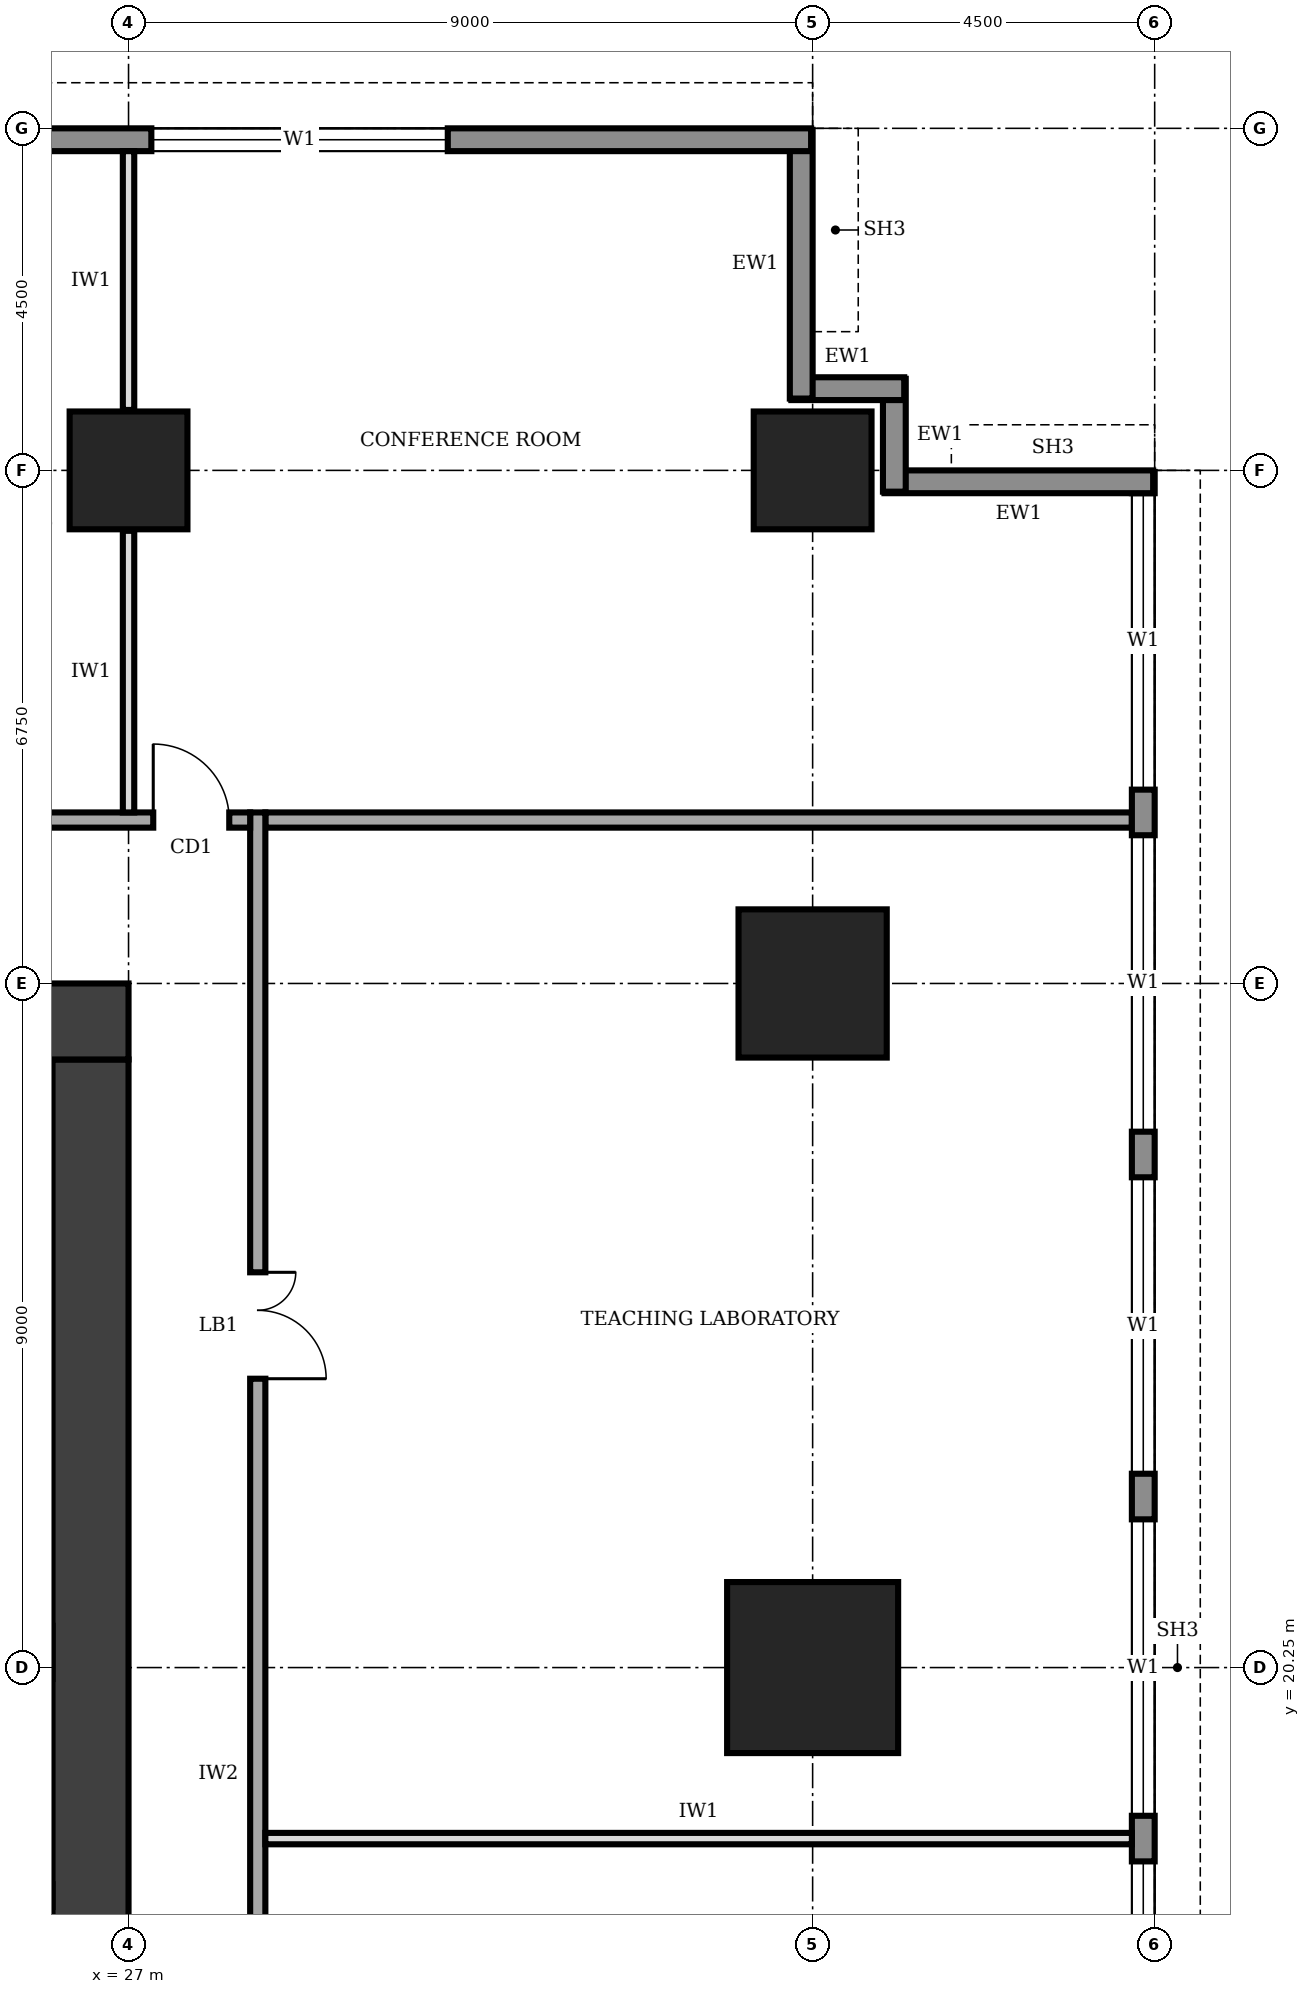
"""IFC4 building model, lengths in metres.
Left out: names, types, materials, properties, quantities, classifications, styles, units other than length and angle.
Written with IfcOpenShell. Run it as: python <this file> out.ifc"""

import sys

from ifc_helpers import new_model, si_unit, direction, frame, frame_2d, origin, origin_2d, place, context, subcontext, project, spatial, rectangle, extrude, element, fill, save


model = new_model("IFC4")
c1 = context("Model", 3, precision=1e-05, world=origin(), true_north=direction((0.0, 1.0)))
c2 = subcontext(c1, "Body", "Model", "MODEL_VIEW")
j1 = project(units=[si_unit("LENGTHUNIT", "METRE"), si_unit("PLANEANGLEUNIT", "RADIAN")], contexts=[c1])
p1 = place(None, origin())
s1 = spatial("IfcSite", under=j1, at=p1, CompositionType="ELEMENT")
p2 = place(p1, origin())
s2 = spatial("IfcBuilding", under=s1, at=p2, CompositionType="ELEMENT")
p3 = place(p2, frame((0.0, 0.0, 213.0)))
s3 = spatial("IfcBuildingStorey", under=s2, at=p3, CompositionType="ELEMENT", Elevation=213.0)
p4 = place(p3, frame((26.5, 12.25, 0.0), z_axis=(0.0, 0.0, 1.0), x_axis=(0.0, 1.0, 0.0)))
e1 = element("IfcWall", 1, at=p4, inside=s3, PredefinedType="SHEAR", context=c2, shape_type="SweptSolid", body=[
    extrude(rectangle(XDim=16.0, YDim=1.0, at=frame_2d((8.0, 0.0))), origin(), (0.0, 0.0, 1.0), 4.0),
])
p5 = place(p3, frame((27.0, 28.75, 0.0), z_axis=(0.0, 0.0, 1.0), x_axis=(-1.0, 0.0, 0.0)))
e2 = element("IfcWall", 2, at=p5, inside=s3, PredefinedType="SHEAR", context=c2, shape_type="SweptSolid", body=[
    extrude(rectangle(XDim=13.5, YDim=1.0, at=frame_2d((6.75, 0.0))), origin(), (0.0, 0.0, 1.0), 4.0),
])
p6 = place(p5, frame((4.75, 0.0, 0.0)))
e3 = element("IfcOpeningElement", 3, at=p6, cuts=e2, PredefinedType="OPENING", context=c2, shape_type="SweptSolid", body=[
    extrude(rectangle(XDim=1.8, YDim=2.1, at=frame_2d((0.9, 1.05))), frame((0.0, 0.51, 0.0), z_axis=(0.0, -1.0, 0.0), x_axis=(1.0, 0.0, 0.0)), (0.0, 0.0, 1.0), 1.02),
])
p7 = place(p3, frame((36.0, 20.25, 0.0), z_axis=(0.0, 0.0, 1.0), x_axis=(1.0, 0.0, 0.0)))
e4 = element("IfcColumn", 4, at=p7, inside=s3, PredefinedType="COLUMN", context=c2, shape_type="SweptSolid", body=[
    extrude(rectangle(XDim=2.25, YDim=2.25, at=origin_2d()), origin(), (0.0, 0.0, 1.0), 4.0),
])
p8 = place(p3, frame((36.0, 29.25, 0.0), z_axis=(0.0, 0.0, 1.0), x_axis=(1.0, 0.0, 0.0)))
e5 = element("IfcColumn", 5, at=p8, inside=s3, PredefinedType="COLUMN", context=c2, shape_type="SweptSolid", body=[
    extrude(rectangle(XDim=1.95, YDim=1.95, at=origin_2d()), origin(), (0.0, 0.0, 1.0), 4.0),
])
for number, where, z_axis, x_axis in (
    (6, (27.0, 36.0, 0.0), (0.0, 0.0, 1.0), (1.0, 0.0, 0.0)),
    (7, (36.0, 36.0, 0.0), (0.0, 0.0, 1.0), (1.0, 0.0, 0.0)),
):
    element("IfcColumn", number, at=place(p3, frame(where, z_axis=z_axis, x_axis=x_axis)), inside=s3, PredefinedType="COLUMN", context=c2, shape_type="SweptSolid", body=[
        extrude(rectangle(XDim=1.55, YDim=1.55, at=origin_2d()), origin(), (0.0, 0.0, 1.0), 4.0),
    ])
p9 = place(p3, frame((40.35, 4.52, 0.0), z_axis=(0.0, 0.0, 1.0), x_axis=(0.0, 1.0, 0.0)))
e8 = element("IfcWall", 8, at=p9, inside=s3, PredefinedType="STANDARD", context=c2, shape_type="SweptSolid", body=[
    extrude(rectangle(XDim=31.46, YDim=0.3, at=frame_2d((15.73, 0.0))), origin(), (0.0, 0.0, 1.0), 3.75),
])
p10 = place(p9, frame((4.78, 0.0, 0.9)))
e9 = element("IfcOpeningElement", 9, at=p10, cuts=e8, PredefinedType="OPENING", context=c2, shape_type="SweptSolid", body=[
    extrude(rectangle(XDim=3.9, YDim=2.2, at=frame_2d((1.95, 1.1))), frame((0.0, 0.16, 0.0), z_axis=(0.0, -1.0, 0.0), x_axis=(1.0, 0.0, 0.0)), (0.0, 0.0, 1.0), 0.32),
])
p11 = place(p9, frame((9.28, 0.0, 0.9)))
e10 = element("IfcOpeningElement", 10, at=p11, cuts=e8, PredefinedType="OPENING", context=c2, shape_type="SweptSolid", body=[
    extrude(rectangle(XDim=3.9, YDim=2.2, at=frame_2d((1.95, 1.1))), frame((0.0, 0.16, 0.0), z_axis=(0.0, -1.0, 0.0), x_axis=(1.0, 0.0, 0.0)), (0.0, 0.0, 1.0), 0.32),
])
p12 = place(p9, frame((13.78, 0.0, 0.9)))
e11 = element("IfcOpeningElement", 11, at=p12, cuts=e8, PredefinedType="OPENING", context=c2, shape_type="SweptSolid", body=[
    extrude(rectangle(XDim=3.9, YDim=2.2, at=frame_2d((1.95, 1.1))), frame((0.0, 0.16, 0.0), z_axis=(0.0, -1.0, 0.0), x_axis=(1.0, 0.0, 0.0)), (0.0, 0.0, 1.0), 0.32),
])
p13 = place(p9, frame((18.28, 0.0, 0.9)))
e12 = element("IfcOpeningElement", 12, at=p13, cuts=e8, PredefinedType="OPENING", context=c2, shape_type="SweptSolid", body=[
    extrude(rectangle(XDim=3.9, YDim=2.2, at=frame_2d((1.95, 1.1))), frame((0.0, 0.16, 0.0), z_axis=(0.0, -1.0, 0.0), x_axis=(1.0, 0.0, 0.0)), (0.0, 0.0, 1.0), 0.32),
])
p14 = place(p9, frame((22.78, 0.0, 0.9)))
e13 = element("IfcOpeningElement", 13, at=p14, cuts=e8, PredefinedType="OPENING", context=c2, shape_type="SweptSolid", body=[
    extrude(rectangle(XDim=3.9, YDim=2.2, at=frame_2d((1.95, 1.1))), frame((0.0, 0.16, 0.0), z_axis=(0.0, -1.0, 0.0), x_axis=(1.0, 0.0, 0.0)), (0.0, 0.0, 1.0), 0.32),
])
p15 = place(p9, frame((27.28, 0.0, 0.9)))
e14 = element("IfcOpeningElement", 14, at=p15, cuts=e8, PredefinedType="OPENING", context=c2, shape_type="SweptSolid", body=[
    extrude(rectangle(XDim=3.9, YDim=2.2, at=frame_2d((1.95, 1.1))), frame((0.0, 0.16, 0.0), z_axis=(0.0, -1.0, 0.0), x_axis=(1.0, 0.0, 0.0)), (0.0, 0.0, 1.0), 0.32),
])
p16 = place(p3, frame((40.48, 35.85, 0.0), z_axis=(0.0, 0.0, 1.0), x_axis=(-1.0, 0.0, 0.0)))
e15 = element("IfcWall", 15, at=p16, inside=s3, PredefinedType="STANDARD", context=c2, shape_type="SweptSolid", body=[
    extrude(rectangle(XDim=3.535, YDim=0.3, at=frame_2d((1.768, 0.0))), origin(), (0.0, 0.0, 1.0), 2.85),
])
for number, where, z_axis, x_axis in (
    (16, (37.075, 35.72, 0.0), (0.0, 0.0, 1.0), (0.0, 1.0, 0.0)),
    (17, (37.205, 37.075, 0.0), (0.0, 0.0, 1.0), (-1.0, 0.0, 0.0)),
):
    element("IfcWall", number, at=place(p3, frame(where, z_axis=z_axis, x_axis=x_axis)), inside=s3, PredefinedType="STANDARD", context=c2, shape_type="SweptSolid", body=[
        extrude(rectangle(XDim=1.485, YDim=0.3, at=frame_2d((0.743, 0.0))), origin(), (0.0, 0.0, 1.0), 3.75),
    ])
p17 = place(p3, frame((35.85, 36.945, 0.0), z_axis=(0.0, 0.0, 1.0), x_axis=(0.0, 1.0, 0.0)))
e18 = element("IfcWall", 18, at=p17, inside=s3, PredefinedType="STANDARD", context=c2, shape_type="SweptSolid", body=[
    extrude(rectangle(XDim=3.535, YDim=0.3, at=frame_2d((1.768, 0.0))), origin(), (0.0, 0.0, 1.0), 2.85),
])
p18 = place(p3, frame((35.98, 40.35, 0.0), z_axis=(0.0, 0.0, 1.0), x_axis=(-1.0, 0.0, 0.0)))
e19 = element("IfcWall", 19, at=p18, inside=s3, PredefinedType="STANDARD", context=c2, shape_type="SweptSolid", body=[
    extrude(rectangle(XDim=31.46, YDim=0.3, at=frame_2d((15.73, 0.0))), origin(), (0.0, 0.0, 1.0), 3.75),
])
p19 = place(p18, frame((27.28, 0.0, 0.9)))
e20 = element("IfcOpeningElement", 20, at=p19, cuts=e19, PredefinedType="OPENING", context=c2, shape_type="SweptSolid", body=[
    extrude(rectangle(XDim=3.9, YDim=2.2, at=frame_2d((1.95, 1.1))), frame((0.0, 0.16, 0.0), z_axis=(0.0, -1.0, 0.0), x_axis=(1.0, 0.0, 0.0)), (0.0, 0.0, 1.0), 0.32),
])
p20 = place(p18, frame((22.78, 0.0, 0.9)))
e21 = element("IfcOpeningElement", 21, at=p20, cuts=e19, PredefinedType="OPENING", context=c2, shape_type="SweptSolid", body=[
    extrude(rectangle(XDim=3.9, YDim=2.2, at=frame_2d((1.95, 1.1))), frame((0.0, 0.16, 0.0), z_axis=(0.0, -1.0, 0.0), x_axis=(1.0, 0.0, 0.0)), (0.0, 0.0, 1.0), 0.32),
])
p21 = place(p18, frame((4.78, 0.0, 0.9)))
e22 = element("IfcOpeningElement", 22, at=p21, cuts=e19, PredefinedType="OPENING", context=c2, shape_type="SweptSolid", body=[
    extrude(rectangle(XDim=3.9, YDim=2.2, at=frame_2d((1.95, 1.1))), frame((0.0, 0.16, 0.0), z_axis=(0.0, -1.0, 0.0), x_axis=(1.0, 0.0, 0.0)), (0.0, 0.0, 1.0), 0.32),
])
p22 = place(p3, frame((28.7, 7.7, 0.0), z_axis=(0.0, 0.0, 1.0), x_axis=(0.0, 1.0, 0.0)))
e23 = element("IfcWall", 23, at=p22, inside=s3, PredefinedType="SOLIDWALL", context=c2, shape_type="SweptSolid", body=[
    extrude(rectangle(XDim=23.8, YDim=0.2, at=frame_2d((11.9, 0.0))), origin(), (0.0, 0.0, 1.0), 3.75),
])
p23 = place(p22, frame((4.15, 0.0, 0.0)))
e24 = element("IfcOpeningElement", 24, at=p23, cuts=e23, PredefinedType="OPENING", context=c2, shape_type="SweptSolid", body=[
    extrude(rectangle(XDim=1.8, YDim=2.1, at=frame_2d((0.9, 1.05))), frame((0.0, 0.11, 0.0), z_axis=(0.0, -1.0, 0.0), x_axis=(1.0, 0.0, 0.0)), (0.0, 0.0, 1.0), 0.22),
])
p24 = place(p22, frame((16.35, 0.0, 0.0)))
e25 = element("IfcOpeningElement", 25, at=p24, cuts=e23, PredefinedType="OPENING", context=c2, shape_type="SweptSolid", body=[
    extrude(rectangle(XDim=1.4, YDim=2.1, at=frame_2d((0.7, 1.05))), frame((0.0, 0.11, 0.0), z_axis=(0.0, -1.0, 0.0), x_axis=(1.0, 0.0, 0.0)), (0.0, 0.0, 1.0), 0.22),
])
p25 = place(p3, frame((28.6, 31.4, 0.0), z_axis=(0.0, 0.0, 1.0), x_axis=(-1.0, 0.0, 0.0)))
e26 = element("IfcWall", 26, at=p25, inside=s3, PredefinedType="SOLIDWALL", context=c2, shape_type="SweptSolid", body=[
    extrude(rectangle(XDim=16.9, YDim=0.2, at=frame_2d((8.45, 0.0))), origin(), (0.0, 0.0, 1.0), 3.75),
])
p26 = place(p25, frame((15.425, 0.0, 0.0)))
e27 = element("IfcOpeningElement", 27, at=p26, cuts=e26, PredefinedType="OPENING", context=c2, shape_type="SweptSolid", body=[
    extrude(rectangle(XDim=1.0, YDim=2.1, at=frame_2d((0.5, 1.05))), frame((0.0, 0.11, 0.0), z_axis=(0.0, -1.0, 0.0), x_axis=(1.0, 0.0, 0.0)), (0.0, 0.0, 1.0), 0.22),
])
p27 = place(p25, frame((12.35, 0.0, 0.0)))
e28 = element("IfcOpeningElement", 28, at=p27, cuts=e26, PredefinedType="OPENING", context=c2, shape_type="SweptSolid", body=[
    extrude(rectangle(XDim=1.0, YDim=2.1, at=frame_2d((0.5, 1.05))), frame((0.0, 0.11, 0.0), z_axis=(0.0, -1.0, 0.0), x_axis=(1.0, 0.0, 0.0)), (0.0, 0.0, 1.0), 0.22),
])
p28 = place(p25, frame((5.6, 0.0, 0.0)))
e29 = element("IfcOpeningElement", 29, at=p28, cuts=e26, PredefinedType="OPENING", context=c2, shape_type="SweptSolid", body=[
    extrude(rectangle(XDim=1.0, YDim=2.1, at=frame_2d((0.5, 1.05))), frame((0.0, 0.11, 0.0), z_axis=(0.0, -1.0, 0.0), x_axis=(1.0, 0.0, 0.0)), (0.0, 0.0, 1.0), 0.22),
])
p29 = place(p25, frame((0.275, 0.0, 0.0)))
e30 = element("IfcOpeningElement", 30, at=p29, cuts=e26, PredefinedType="OPENING", context=c2, shape_type="SweptSolid", body=[
    extrude(rectangle(XDim=1.0, YDim=2.1, at=frame_2d((0.5, 1.05))), frame((0.0, 0.11, 0.0), z_axis=(0.0, -1.0, 0.0), x_axis=(1.0, 0.0, 0.0)), (0.0, 0.0, 1.0), 0.22),
])
p30 = place(p3, frame((28.8, 31.4, 0.0), z_axis=(0.0, 0.0, 1.0), x_axis=(1.0, 0.0, 0.0)))
e31 = element("IfcWall", 31, at=p30, inside=s3, PredefinedType="SOLIDWALL", context=c2, shape_type="SweptSolid", body=[
    extrude(rectangle(XDim=11.4, YDim=0.2, at=frame_2d((5.7, 0.0))), origin(), (0.0, 0.0, 1.0), 3.75),
])
p31 = place(p3, frame((27.0, 31.5, 0.0), z_axis=(0.0, 0.0, 1.0), x_axis=(0.0, 1.0, 0.0)))
e32 = element("IfcWall", 32, at=p31, inside=s3, PredefinedType="PARTITIONING", context=c2, shape_type="SweptSolid", body=[
    extrude(rectangle(XDim=3.705, YDim=0.15, at=frame_2d((1.853, 0.0))), origin(), (0.0, 0.0, 1.0), 2.85),
])
p32 = place(p3, frame((27.0, 36.795, 0.0), z_axis=(0.0, 0.0, 1.0), x_axis=(0.0, 1.0, 0.0)))
e33 = element("IfcWall", 33, at=p32, inside=s3, PredefinedType="PARTITIONING", context=c2, shape_type="SweptSolid", body=[
    extrude(rectangle(XDim=3.405, YDim=0.15, at=frame_2d((1.703, 0.0))), origin(), (0.0, 0.0, 1.0), 2.85),
])
p33 = place(p3, frame((28.8, 18.0, 0.0), z_axis=(0.0, 0.0, 1.0), x_axis=(1.0, 0.0, 0.0)))
e34 = element("IfcWall", 34, at=p33, inside=s3, PredefinedType="PARTITIONING", context=c2, shape_type="SweptSolid", body=[
    extrude(rectangle(XDim=11.4, YDim=0.15, at=frame_2d((5.7, 0.0))), origin(), (0.0, 0.0, 1.0), 3.75),
])
p34 = place(p11, origin())
e35 = element("IfcWindow", 35, at=p34, inside=s3, PartitioningType="SINGLE_PANEL", PredefinedType="WINDOW", context=c2, shape_type="SweptSolid", body=[
    extrude(rectangle(XDim=3.9, YDim=2.2, at=frame_2d((1.95, 1.1))), frame((0.0, 0.03, 0.0), z_axis=(0.0, -1.0, 0.0), x_axis=(1.0, 0.0, 0.0)), (0.0, 0.0, 1.0), 0.06),
])
fill(e10, e35)
p35 = place(p12, origin())
e36 = element("IfcWindow", 36, at=p35, inside=s3, PartitioningType="SINGLE_PANEL", PredefinedType="WINDOW", context=c2, shape_type="SweptSolid", body=[
    extrude(rectangle(XDim=3.9, YDim=2.2, at=frame_2d((1.95, 1.1))), frame((0.0, 0.03, 0.0), z_axis=(0.0, -1.0, 0.0), x_axis=(1.0, 0.0, 0.0)), (0.0, 0.0, 1.0), 0.06),
])
fill(e11, e36)
p36 = place(p13, origin())
e37 = element("IfcWindow", 37, at=p36, inside=s3, PartitioningType="SINGLE_PANEL", PredefinedType="WINDOW", context=c2, shape_type="SweptSolid", body=[
    extrude(rectangle(XDim=3.9, YDim=2.2, at=frame_2d((1.95, 1.1))), frame((0.0, 0.03, 0.0), z_axis=(0.0, -1.0, 0.0), x_axis=(1.0, 0.0, 0.0)), (0.0, 0.0, 1.0), 0.06),
])
fill(e12, e37)
p37 = place(p14, origin())
e38 = element("IfcWindow", 38, at=p37, inside=s3, PartitioningType="SINGLE_PANEL", PredefinedType="WINDOW", context=c2, shape_type="SweptSolid", body=[
    extrude(rectangle(XDim=3.9, YDim=2.2, at=frame_2d((1.95, 1.1))), frame((0.0, 0.03, 0.0), z_axis=(0.0, -1.0, 0.0), x_axis=(1.0, 0.0, 0.0)), (0.0, 0.0, 1.0), 0.06),
])
fill(e13, e38)
p38 = place(p15, origin())
e39 = element("IfcWindow", 39, at=p38, inside=s3, PartitioningType="SINGLE_PANEL", PredefinedType="WINDOW", context=c2, shape_type="SweptSolid", body=[
    extrude(rectangle(XDim=3.9, YDim=2.2, at=frame_2d((1.95, 1.1))), frame((0.0, 0.03, 0.0), z_axis=(0.0, -1.0, 0.0), x_axis=(1.0, 0.0, 0.0)), (0.0, 0.0, 1.0), 0.06),
])
fill(e14, e39)
p39 = place(p21, origin())
e40 = element("IfcWindow", 40, at=p39, inside=s3, PartitioningType="SINGLE_PANEL", PredefinedType="WINDOW", context=c2, shape_type="SweptSolid", body=[
    extrude(rectangle(XDim=3.9, YDim=2.2, at=frame_2d((1.95, 1.1))), frame((0.0, 0.03, 0.0), z_axis=(0.0, -1.0, 0.0), x_axis=(1.0, 0.0, 0.0)), (0.0, 0.0, 1.0), 0.06),
])
fill(e22, e40)
p40 = place(p24, frame((1.4, 0.0, 0.0), z_axis=(0.0, 0.0, 1.0), x_axis=(-1.0, 0.0, 0.0)))
e41 = element("IfcDoor", 41, at=p40, inside=s3, OperationType="DOUBLE_DOOR_SINGLE_SWING", PredefinedType="DOOR", context=c2, shape_type="SweptSolid", body=[
    extrude(rectangle(XDim=1.4, YDim=2.1, at=frame_2d((0.7, 1.05))), frame((0.0, 0.025, 0.0), z_axis=(0.0, -1.0, 0.0), x_axis=(1.0, 0.0, 0.0)), (0.0, 0.0, 1.0), 0.05),
])
fill(e25, e41)
p41 = place(p29, frame((1.0, 0.0, 0.0), z_axis=(0.0, 0.0, 1.0), x_axis=(-1.0, 0.0, 0.0)))
e42 = element("IfcDoor", 42, at=p41, inside=s3, OperationType="SINGLE_SWING_LEFT", PredefinedType="DOOR", context=c2, shape_type="SweptSolid", body=[
    extrude(rectangle(XDim=1.0, YDim=2.1, at=frame_2d((0.5, 1.05))), frame((0.0, 0.025, 0.0), z_axis=(0.0, -1.0, 0.0), x_axis=(1.0, 0.0, 0.0)), (0.0, 0.0, 1.0), 0.05),
])
fill(e30, e42)
save(model, sys.argv[1])
